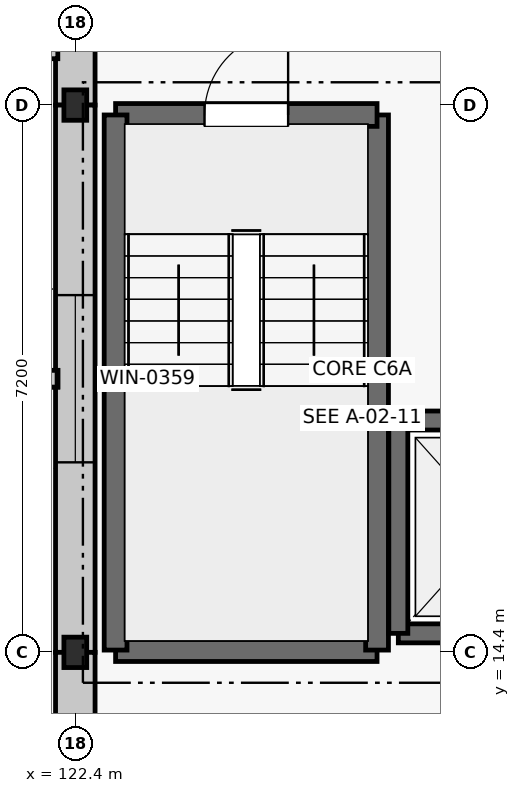
"""IFC4 building model, lengths in metres.
Left out: names, types, materials, properties, quantities, classifications, styles, units other than length and angle.
Written with IfcOpenShell. Run it as: python <this file> out.ifc"""

import sys

from ifc_helpers import new_model, si_unit, direction, frame, frame_2d, origin, origin_2d, place, context, subcontext, project, spatial, rectangle, i_section, extrude, element, fill, save


model = new_model("IFC4")
c1 = context("Model", 3, precision=1e-05, world=origin(), true_north=direction((0.0, 1.0)))
c2 = subcontext(c1, "Body", "Model", "MODEL_VIEW")
j1 = project(units=[si_unit("LENGTHUNIT", "METRE"), si_unit("PLANEANGLEUNIT", "RADIAN")], contexts=[c1])
p1 = place(None, origin())
s1 = spatial("IfcSite", under=j1, at=p1, CompositionType="ELEMENT")
p2 = place(p1, origin())
s2 = spatial("IfcBuilding", under=s1, at=p2, CompositionType="ELEMENT")
p3 = place(p2, origin())
s3 = spatial("IfcBuildingStorey", under=s2, at=p3, CompositionType="ELEMENT", Elevation=0.0)
for number, where, z_axis, x_axis in (
    (1, (122.4, 14.4, 0.0), (0.0, 0.0, 1.0), (1.0, 0.0, 0.0)),
    (2, (122.4, 21.6, 0.0), (0.0, 0.0, 1.0), (1.0, 0.0, 0.0)),
):
    element("IfcColumn", number, at=place(p3, frame(where, z_axis=z_axis, x_axis=x_axis)), inside=s3, PredefinedType="COLUMN", context=c2, shape_type="SweptSolid", body=[
        extrude(i_section(OverallWidth=0.3, OverallDepth=0.4, WebThickness=0.013, FlangeThickness=0.024, FilletRadius=0.027, at=origin_2d()), origin(), (0.0, 0.0, 1.0), 5.4),
    ])
p4 = place(p3, frame((122.4, 28.8, 0.0), z_axis=(0.0, 0.0, 1.0), x_axis=(0.0, -1.0, 0.0)))
e3 = element("IfcWall", 3, at=p4, inside=s3, PredefinedType="SOLIDWALL", context=c2, shape_type="SweptSolid", body=[
    extrude(rectangle(XDim=7.2, YDim=0.52, at=frame_2d((3.6, 0.0))), origin(), (0.0, 0.0, 1.0), 4.4),
])
p5 = place(p4, frame((3.9, 0.0, 0.0)))
e4 = element("IfcOpeningElement", 4, at=p5, cuts=e3, PredefinedType="OPENING", context=c2, shape_type="SweptSolid", body=[
    extrude(rectangle(XDim=1.8, YDim=2.2, at=frame_2d((0.9, 1.1))), frame((0.0, 0.272, 0.0), z_axis=(0.0, -1.0, 0.0), x_axis=(1.0, 0.0, 0.0)), (0.0, 0.0, 1.0), 0.544),
])
p6 = place(p3, frame((122.4, 21.6, 0.0), z_axis=(0.0, 0.0, 1.0), x_axis=(0.0, -1.0, 0.0)))
e5 = element("IfcWall", 5, at=p6, inside=s3, PredefinedType="SOLIDWALL", context=c2, shape_type="SweptSolid", body=[
    extrude(rectangle(XDim=7.2, YDim=0.52, at=frame_2d((3.6, 0.0))), origin(), (0.0, 0.0, 1.0), 4.4),
])
p7 = place(p6, frame((2.5, 0.0, 0.9)))
e6 = element("IfcOpeningElement", 6, at=p7, cuts=e5, PredefinedType="OPENING", context=c2, shape_type="SweptSolid", body=[
    extrude(rectangle(XDim=2.2, YDim=2.25, at=frame_2d((1.1, 1.125))), frame((0.0, 0.272, 0.0), z_axis=(0.0, -1.0, 0.0), x_axis=(1.0, 0.0, 0.0)), (0.0, 0.0, 1.0), 0.544),
])
p8 = place(p3, frame((122.4, 14.4, 0.0), z_axis=(0.0, 0.0, 1.0), x_axis=(0.0, -1.0, 0.0)))
e7 = element("IfcWall", 7, at=p8, inside=s3, PredefinedType="SOLIDWALL", context=c2, shape_type="SweptSolid", body=[
    extrude(rectangle(XDim=7.2, YDim=0.52, at=frame_2d((3.6, 0.0))), origin(), (0.0, 0.0, 1.0), 4.4),
])
p9 = place(p8, frame((2.5, 0.0, 0.9)))
e8 = element("IfcOpeningElement", 8, at=p9, cuts=e7, PredefinedType="OPENING", context=c2, shape_type="SweptSolid", body=[
    extrude(rectangle(XDim=2.2, YDim=2.25, at=frame_2d((1.1, 1.125))), frame((0.0, 0.272, 0.0), z_axis=(0.0, -1.0, 0.0), x_axis=(1.0, 0.0, 0.0)), (0.0, 0.0, 1.0), 0.544),
])
p10 = place(p3, frame((122.93, 14.43, 0.0), z_axis=(0.0, 0.0, 1.0), x_axis=(1.0, 0.0, 0.0)))
e9 = element("IfcWall", 9, at=p10, inside=s3, PredefinedType="SHEAR", context=c2, shape_type="SweptSolid", body=[
    extrude(rectangle(XDim=3.44, YDim=0.3, at=frame_2d((1.72, 0.0))), origin(), (0.0, 0.0, 1.0), 5.12),
])
p11 = place(p3, frame((126.37, 14.43, 0.0), z_axis=(0.0, 0.0, 1.0), x_axis=(0.0, 1.0, 0.0)))
e10 = element("IfcWall", 10, at=p11, inside=s3, PredefinedType="SHEAR", context=c2, shape_type="SweptSolid", body=[
    extrude(rectangle(XDim=7.04, YDim=0.3, at=frame_2d((3.52, 0.0))), origin(), (0.0, 0.0, 1.0), 5.12),
])
p12 = place(p3, frame((126.37, 21.47, 0.0), z_axis=(0.0, 0.0, 1.0), x_axis=(-1.0, 0.0, 0.0)))
e11 = element("IfcWall", 11, at=p12, inside=s3, PredefinedType="SHEAR", context=c2, shape_type="SweptSolid", body=[
    extrude(rectangle(XDim=3.44, YDim=0.3, at=frame_2d((1.72, 0.0))), origin(), (0.0, 0.0, 1.0), 5.12),
])
p13 = place(p12, frame((1.17, 0.0, 0.0)))
e12 = element("IfcOpeningElement", 12, at=p13, cuts=e11, PredefinedType="OPENING", context=c2, shape_type="SweptSolid", body=[
    extrude(rectangle(XDim=1.1, YDim=2.15, at=frame_2d((0.55, 1.075))), frame((0.0, 0.162, 0.0), z_axis=(0.0, -1.0, 0.0), x_axis=(1.0, 0.0, 0.0)), (0.0, 0.0, 1.0), 0.324),
])
p14 = place(p3, frame((122.93, 21.47, 0.0), z_axis=(0.0, 0.0, 1.0), x_axis=(0.0, -1.0, 0.0)))
e13 = element("IfcWall", 13, at=p14, inside=s3, PredefinedType="SHEAR", context=c2, shape_type="SweptSolid", body=[
    extrude(rectangle(XDim=7.04, YDim=0.3, at=frame_2d((3.52, 0.0))), origin(), (0.0, 0.0, 1.0), 5.12),
])
p15 = place(p3, frame((126.65, 14.65, 0.0), z_axis=(0.0, 0.0, 1.0), x_axis=(1.0, 0.0, 0.0)))
e14 = element("IfcWall", 14, at=p15, inside=s3, PredefinedType="SHEAR", context=c2, shape_type="SweptSolid", body=[
    extrude(rectangle(XDim=2.55, YDim=0.25, at=frame_2d((1.275, 0.0))), origin(), (0.0, 0.0, 1.0), 5.12),
])
p16 = place(p3, frame((129.2, 17.45, 0.0), z_axis=(0.0, 0.0, 1.0), x_axis=(-1.0, 0.0, 0.0)))
e15 = element("IfcWall", 15, at=p16, inside=s3, PredefinedType="SHEAR", context=c2, shape_type="SweptSolid", body=[
    extrude(rectangle(XDim=2.55, YDim=0.25, at=frame_2d((1.275, 0.0))), origin(), (0.0, 0.0, 1.0), 5.12),
])
p17 = place(p16, frame((0.725, 0.0, 0.0)))
e16 = element("IfcOpeningElement", 16, at=p17, cuts=e15, PredefinedType="OPENING", context=c2, shape_type="SweptSolid", body=[
    extrude(rectangle(XDim=1.1, YDim=2.1, at=frame_2d((0.55, 1.05))), frame((0.0, 0.137, 0.0), z_axis=(0.0, -1.0, 0.0), x_axis=(1.0, 0.0, 0.0)), (0.0, 0.0, 1.0), 0.274),
])
p18 = place(p3, frame((126.65, 17.45, 0.0), z_axis=(0.0, 0.0, 1.0), x_axis=(0.0, -1.0, 0.0)))
e17 = element("IfcWall", 17, at=p18, inside=s3, PredefinedType="SHEAR", context=c2, shape_type="SweptSolid", body=[
    extrude(rectangle(XDim=2.8, YDim=0.25, at=frame_2d((1.4, 0.0))), origin(), (0.0, 0.0, 1.0), 5.12),
])
p19 = place(p7, origin())
e18 = element("IfcWindow", 18, at=p19, inside=s3, PartitioningType="SINGLE_PANEL", PredefinedType="WINDOW", context=c2, shape_type="SweptSolid", body=[
    extrude(rectangle(XDim=2.2, YDim=2.25, at=frame_2d((1.1, 1.125))), frame((0.0, 0.03, 0.0), z_axis=(0.0, -1.0, 0.0), x_axis=(1.0, 0.0, 0.0)), (0.0, 0.0, 1.0), 0.06),
])
fill(e6, e18)
p20 = place(p13, frame((1.1, 0.0, 0.0), z_axis=(0.0, 0.0, 1.0), x_axis=(-1.0, 0.0, 0.0)))
e19 = element("IfcDoor", 19, at=p20, inside=s3, OperationType="SINGLE_SWING_RIGHT", PredefinedType="DOOR", context=c2, shape_type="SweptSolid", body=[
    extrude(rectangle(XDim=1.1, YDim=2.15, at=frame_2d((0.55, 1.075))), frame((0.0, 0.025, 0.0), z_axis=(0.0, -1.0, 0.0), x_axis=(1.0, 0.0, 0.0)), (0.0, 0.0, 1.0), 0.05),
])
fill(e12, e19)
save(model, sys.argv[1])
